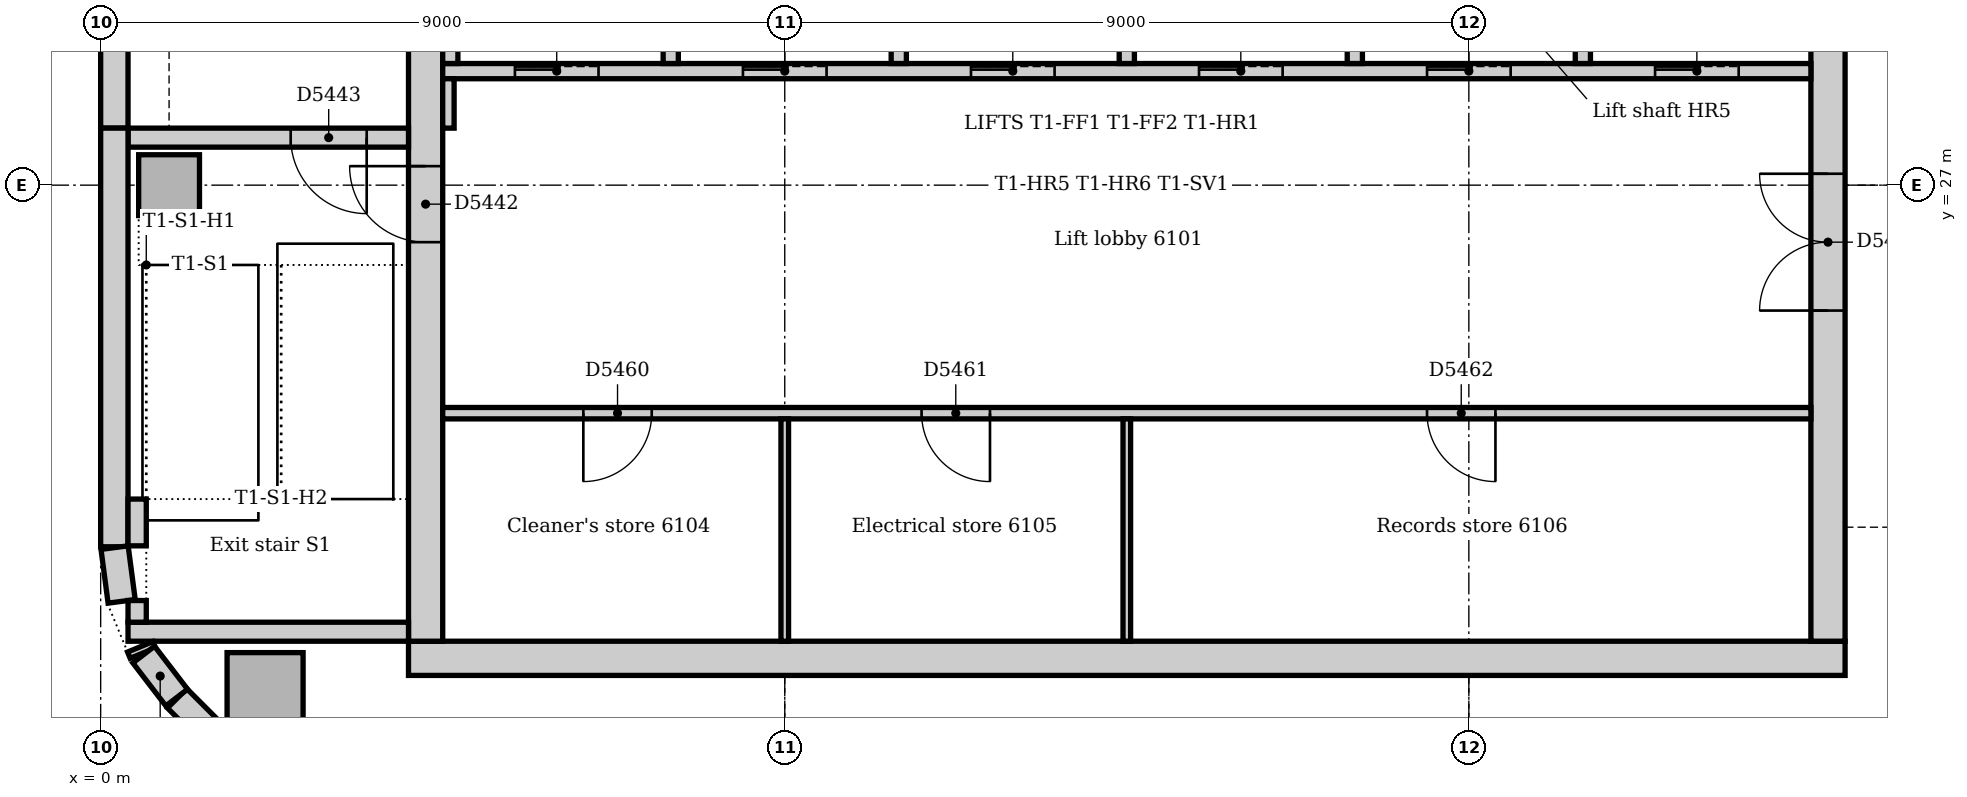
"""IFC4 building model, lengths in metres.
Left out: names, types, materials, properties, quantities, classifications, styles, units other than length and angle.
Written with IfcOpenShell. Run it as: python <this file> out.ifc"""

import sys

from ifc_helpers import new_model, si_unit, direction, frame, frame_2d, origin, origin_2d, place, context, subcontext, project, spatial, rectangle, extrude, element, fill, save


model = new_model("IFC4")
c1 = context("Model", 3, precision=1e-05, world=origin(), true_north=direction((0.0, 1.0)))
c2 = subcontext(c1, "Body", "Model", "MODEL_VIEW")
j1 = project(units=[si_unit("LENGTHUNIT", "METRE"), si_unit("PLANEANGLEUNIT", "RADIAN")], contexts=[c1])
p1 = place(None, origin())
s1 = spatial("IfcSite", under=j1, at=p1, CompositionType="ELEMENT")
p2 = place(p1, origin())
s2 = spatial("IfcBuilding", under=s1, at=p2, CompositionType="ELEMENT")
p3 = place(p2, frame((0.0, 0.0, 255.0)))
s3 = spatial("IfcBuildingStorey", under=s2, at=p3, CompositionType="ELEMENT", Elevation=255.0)
p4 = place(p3, frame((4.05, 20.775, 0.0), z_axis=(0.0, 0.0, 1.0), x_axis=(1.0, 0.0, 0.0)))
e1 = element("IfcWall", 1, at=p4, inside=s3, PredefinedType="SOLIDWALL", context=c2, shape_type="SweptSolid", body=[
    extrude(rectangle(XDim=18.9, YDim=0.45, at=frame_2d((9.45, 0.0))), origin(), (0.0, 0.0, 1.0), 4.0),
])
p5 = place(p3, frame((22.725, 21.0, 0.0), z_axis=(0.0, 0.0, 1.0), x_axis=(0.0, 1.0, 0.0)))
e2 = element("IfcWall", 2, at=p5, inside=s3, PredefinedType="SOLIDWALL", context=c2, shape_type="SweptSolid", body=[
    extrude(rectangle(XDim=10.5, YDim=0.45, at=frame_2d((5.25, 0.0))), origin(), (0.0, 0.0, 1.0), 4.0),
])
p6 = place(p5, frame((4.35, 0.0, 0.0)))
e3 = element("IfcOpeningElement", 3, at=p6, cuts=e2, PredefinedType="OPENING", context=c2, shape_type="SweptSolid", body=[
    extrude(rectangle(XDim=1.8, YDim=2.1, at=frame_2d((0.9, 1.05))), frame((0.0, 0.235, 0.0), z_axis=(0.0, -1.0, 0.0), x_axis=(1.0, 0.0, 0.0)), (0.0, 0.0, 1.0), 0.47),
])
p7 = place(p3, frame((4.275, 31.5, 0.0), z_axis=(0.0, 0.0, 1.0), x_axis=(0.0, -1.0, 0.0)))
e4 = element("IfcWall", 4, at=p7, inside=s3, PredefinedType="SOLIDWALL", context=c2, shape_type="SweptSolid", body=[
    extrude(rectangle(XDim=10.5, YDim=0.45, at=frame_2d((5.25, 0.0))), origin(), (0.0, 0.0, 1.0), 4.0),
])
p8 = place(p7, frame((4.25, 0.0, 0.0)))
e5 = element("IfcOpeningElement", 5, at=p8, cuts=e4, PredefinedType="OPENING", context=c2, shape_type="SweptSolid", body=[
    extrude(rectangle(XDim=1.0, YDim=2.1, at=frame_2d((0.5, 1.05))), frame((0.0, 0.235, 0.0), z_axis=(0.0, -1.0, 0.0), x_axis=(1.0, 0.0, 0.0)), (0.0, 0.0, 1.0), 0.47),
])
p9 = place(p3, frame((0.36, 21.125, 0.0), z_axis=(0.0, 0.0, 1.0), x_axis=(1.0, 0.0, 0.0)))
e6 = element("IfcWall", 6, at=p9, inside=s3, PredefinedType="SOLIDWALL", context=c2, shape_type="SweptSolid", body=[
    extrude(rectangle(XDim=3.69, YDim=0.25, at=frame_2d((1.845, 0.0))), origin(), (0.0, 0.0, 1.0), 4.0),
])
p10 = place(p3, frame((4.05, 27.625, 0.0), z_axis=(0.0, 0.0, 1.0), x_axis=(-1.0, 0.0, 0.0)))
e7 = element("IfcWall", 7, at=p10, inside=s3, PredefinedType="SOLIDWALL", context=c2, shape_type="SweptSolid", body=[
    extrude(rectangle(XDim=3.69, YDim=0.25, at=frame_2d((1.845, 0.0))), origin(), (0.0, 0.0, 1.0), 4.0),
])
p11 = place(p10, frame((0.55, 0.0, 0.0)))
e8 = element("IfcOpeningElement", 8, at=p11, cuts=e7, PredefinedType="OPENING", context=c2, shape_type="SweptSolid", body=[
    extrude(rectangle(XDim=1.0, YDim=2.1, at=frame_2d((0.5, 1.05))), frame((0.0, 0.135, 0.0), z_axis=(0.0, -1.0, 0.0), x_axis=(1.0, 0.0, 0.0)), (0.0, 0.0, 1.0), 0.27),
])
p12 = place(p3, frame((2.163, 20.35, 0.0), z_axis=(0.0, 0.0, 1.0), x_axis=(1.0, 0.0, 0.0)))
e9 = element("IfcColumn", 9, at=p12, inside=s3, PredefinedType="COLUMN", context=c2, shape_type="SweptSolid", body=[
    extrude(rectangle(XDim=1.0, YDim=1.0, at=origin_2d()), origin(), (0.0, 0.0, 1.0), 3.85),
])
p13 = place(p3, frame((0.9, 27.0, 0.0), z_axis=(0.0, 0.0, 1.0), x_axis=(1.0, 0.0, 0.0)))
e10 = element("IfcColumn", 10, at=p13, inside=s3, PredefinedType="COLUMN", context=c2, shape_type="SweptSolid", body=[
    extrude(rectangle(XDim=0.8, YDim=0.8, at=origin_2d()), origin(), (0.0, 0.0, 1.0), 4.0),
])
p14 = place(p3, frame((0.18, 35.25, 0.0), z_axis=(0.0, 0.0, 1.0), x_axis=(0.0, -1.0, 0.0)))
e11 = element("IfcWall", 11, at=p14, inside=s3, PredefinedType="STANDARD", context=c2, shape_type="SweptSolid", body=[
    extrude(rectangle(XDim=7.5, YDim=0.36, at=frame_2d((3.75, 0.0))), origin(), (0.0, 0.0, 1.0), 3.85),
])
p15 = place(p3, frame((0.18, 27.75, 0.0), z_axis=(0.0, 0.0, 1.0), x_axis=(0.0, -1.0, 0.0)))
e12 = element("IfcWall", 12, at=p15, inside=s3, PredefinedType="STANDARD", context=c2, shape_type="SweptSolid", body=[
    extrude(rectangle(XDim=5.507, YDim=0.36, at=frame_2d((2.754, 0.0))), origin(), (0.0, 0.0, 1.0), 3.85),
])
p16 = place(p3, frame((1.006, 20.249, 0.0), z_axis=(0.0, 0.0, 1.0), x_axis=(0.707106781187, -0.707106781187, 0.0)))
e13 = element("IfcWall", 13, at=p16, inside=s3, PredefinedType="STANDARD", context=c2, shape_type="SweptSolid", body=[
    extrude(rectangle(XDim=1.757, YDim=0.36, at=frame_2d((0.879, 0.0))), origin(), (0.0, 0.0, 1.0), 3.85),
])
p17 = place(p3, frame((0.183, 22.231, 0.0), z_axis=(0.0, 0.0, 1.0), x_axis=(0.13055608231, -0.99144092581, 0.0)))
e14 = element("IfcWall", 14, at=p17, inside=s3, PredefinedType="STANDARD", context=c2, shape_type="SweptSolid", body=[
    extrude(rectangle(XDim=0.713, YDim=0.36, at=frame_2d((0.356, 0.0))), origin(), (0.0, 0.0, 1.0), 3.85),
])
p18 = place(p3, frame((0.521, 20.927, 0.0), z_axis=(0.0, 0.0, 1.0), x_axis=(0.382549378284, -0.923935048136, 0.0)))
e15 = element("IfcWall", 15, at=p18, inside=s3, PredefinedType="STANDARD", context=c2, shape_type="SweptSolid", body=[
    extrude(rectangle(XDim=0.089, YDim=0.36, at=frame_2d((0.045, 0.0))), origin(), (0.0, 0.0, 1.0), 3.85),
])
p19 = place(p3, frame((0.566, 20.825, 0.0), z_axis=(0.0, 0.0, 1.0), x_axis=(0.608802368033, -0.793321924995, 0.0)))
e16 = element("IfcWall", 16, at=p19, inside=s3, PredefinedType="STANDARD", context=c2, shape_type="SweptSolid", body=[
    extrude(rectangle(XDim=0.713, YDim=0.36, at=frame_2d((0.357, 0.0))), origin(), (0.0, 0.0, 1.0), 3.85),
])
p20 = place(p3, frame((0.48, 21.25, 0.0), z_axis=(0.0, 0.0, 1.0), x_axis=(0.0, 1.0, 0.0)))
e17 = element("IfcWall", 17, at=p20, inside=s3, PredefinedType="STANDARD", context=c2, shape_type="SweptSolid", body=[
    extrude(rectangle(XDim=0.285, YDim=0.24, at=frame_2d((0.143, 0.0))), origin(), (0.0, 0.0, 1.0), 4.0),
])
p21 = place(p3, frame((0.48, 22.255, 0.0), z_axis=(0.0, 0.0, 1.0), x_axis=(0.0, 1.0, 0.0)))
e18 = element("IfcWall", 18, at=p21, inside=s3, PredefinedType="STANDARD", context=c2, shape_type="SweptSolid", body=[
    extrude(rectangle(XDim=0.615, YDim=0.24, at=frame_2d((0.307, 0.0))), origin(), (0.0, 0.0, 1.0), 4.0),
])
p22 = place(p3, frame((4.5, 28.5, 0.0), z_axis=(0.0, 0.0, 1.0), x_axis=(1.0, 0.0, 0.0)))
e19 = element("IfcWall", 19, at=p22, inside=s3, PredefinedType="PARTITIONING", context=c2, shape_type="SweptSolid", body=[
    extrude(rectangle(XDim=18.0, YDim=0.2, at=frame_2d((9.0, 0.0))), origin(), (0.0, 0.0, 1.0), 3.85),
])
p23 = place(p22, frame((0.95, 0.0, 0.0)))
e20 = element("IfcOpeningElement", 20, at=p23, cuts=e19, PredefinedType="OPENING", context=c2, shape_type="SweptSolid", body=[
    extrude(rectangle(XDim=1.1, YDim=2.1, at=frame_2d((0.55, 1.05))), frame((0.0, 0.11, 0.0), z_axis=(0.0, -1.0, 0.0), x_axis=(1.0, 0.0, 0.0)), (0.0, 0.0, 1.0), 0.22),
])
p24 = place(p22, frame((3.95, 0.0, 0.0)))
e21 = element("IfcOpeningElement", 21, at=p24, cuts=e19, PredefinedType="OPENING", context=c2, shape_type="SweptSolid", body=[
    extrude(rectangle(XDim=1.1, YDim=2.1, at=frame_2d((0.55, 1.05))), frame((0.0, 0.11, 0.0), z_axis=(0.0, -1.0, 0.0), x_axis=(1.0, 0.0, 0.0)), (0.0, 0.0, 1.0), 0.22),
])
p25 = place(p22, frame((6.95, 0.0, 0.0)))
e22 = element("IfcOpeningElement", 22, at=p25, cuts=e19, PredefinedType="OPENING", context=c2, shape_type="SweptSolid", body=[
    extrude(rectangle(XDim=1.1, YDim=2.1, at=frame_2d((0.55, 1.05))), frame((0.0, 0.11, 0.0), z_axis=(0.0, -1.0, 0.0), x_axis=(1.0, 0.0, 0.0)), (0.0, 0.0, 1.0), 0.22),
])
p26 = place(p22, frame((9.95, 0.0, 0.0)))
e23 = element("IfcOpeningElement", 23, at=p26, cuts=e19, PredefinedType="OPENING", context=c2, shape_type="SweptSolid", body=[
    extrude(rectangle(XDim=1.1, YDim=2.1, at=frame_2d((0.55, 1.05))), frame((0.0, 0.11, 0.0), z_axis=(0.0, -1.0, 0.0), x_axis=(1.0, 0.0, 0.0)), (0.0, 0.0, 1.0), 0.22),
])
p27 = place(p22, frame((12.95, 0.0, 0.0)))
e24 = element("IfcOpeningElement", 24, at=p27, cuts=e19, PredefinedType="OPENING", context=c2, shape_type="SweptSolid", body=[
    extrude(rectangle(XDim=1.1, YDim=2.1, at=frame_2d((0.55, 1.05))), frame((0.0, 0.11, 0.0), z_axis=(0.0, -1.0, 0.0), x_axis=(1.0, 0.0, 0.0)), (0.0, 0.0, 1.0), 0.22),
])
p28 = place(p22, frame((15.95, 0.0, 0.0)))
e25 = element("IfcOpeningElement", 25, at=p28, cuts=e19, PredefinedType="OPENING", context=c2, shape_type="SweptSolid", body=[
    extrude(rectangle(XDim=1.1, YDim=2.1, at=frame_2d((0.55, 1.05))), frame((0.0, 0.11, 0.0), z_axis=(0.0, -1.0, 0.0), x_axis=(1.0, 0.0, 0.0)), (0.0, 0.0, 1.0), 0.22),
])
for number, where, z_axis, x_axis in (
    (26, (10.5, 28.6, 0.0), (0.0, 0.0, 1.0), (0.0, 1.0, 0.0)),
    (27, (13.5, 28.6, 0.0), (0.0, 0.0, 1.0), (0.0, 1.0, 0.0)),
    (28, (16.5, 28.6, 0.0), (0.0, 0.0, 1.0), (0.0, 1.0, 0.0)),
    (29, (19.5, 28.6, 0.0), (0.0, 0.0, 1.0), (0.0, 1.0, 0.0)),
    (30, (4.6, 28.6, 0.0), (0.0, 0.0, 1.0), (0.0, 1.0, 0.0)),
    (31, (7.5, 28.6, 0.0), (0.0, 0.0, 1.0), (0.0, 1.0, 0.0)),
):
    element("IfcWall", number, at=place(p3, frame(where, z_axis=z_axis, x_axis=x_axis)), inside=s3, PredefinedType="PARTITIONING", context=c2, shape_type="SweptSolid", body=[
        extrude(rectangle(XDim=2.65, YDim=0.2, at=frame_2d((1.325, 0.0))), origin(), (0.0, 0.0, 1.0), 3.85),
    ])
p29 = place(p3, frame((4.5, 24.0, 0.0), z_axis=(0.0, 0.0, 1.0), x_axis=(1.0, 0.0, 0.0)))
e32 = element("IfcWall", 32, at=p29, inside=s3, PredefinedType="PARTITIONING", context=c2, shape_type="SweptSolid", body=[
    extrude(rectangle(XDim=18.0, YDim=0.15, at=frame_2d((9.0, 0.0))), origin(), (0.0, 0.0, 1.0), 3.85),
])
p30 = place(p29, frame((1.85, 0.0, 0.0)))
e33 = element("IfcOpeningElement", 33, at=p30, cuts=e32, PredefinedType="OPENING", context=c2, shape_type="SweptSolid", body=[
    extrude(rectangle(XDim=0.9, YDim=2.1, at=frame_2d((0.45, 1.05))), frame((0.0, 0.085, 0.0), z_axis=(0.0, -1.0, 0.0), x_axis=(1.0, 0.0, 0.0)), (0.0, 0.0, 1.0), 0.17),
])
p31 = place(p29, frame((6.3, 0.0, 0.0)))
e34 = element("IfcOpeningElement", 34, at=p31, cuts=e32, PredefinedType="OPENING", context=c2, shape_type="SweptSolid", body=[
    extrude(rectangle(XDim=0.9, YDim=2.1, at=frame_2d((0.45, 1.05))), frame((0.0, 0.085, 0.0), z_axis=(0.0, -1.0, 0.0), x_axis=(1.0, 0.0, 0.0)), (0.0, 0.0, 1.0), 0.17),
])
p32 = place(p29, frame((12.95, 0.0, 0.0)))
e35 = element("IfcOpeningElement", 35, at=p32, cuts=e32, PredefinedType="OPENING", context=c2, shape_type="SweptSolid", body=[
    extrude(rectangle(XDim=0.9, YDim=2.1, at=frame_2d((0.45, 1.05))), frame((0.0, 0.085, 0.0), z_axis=(0.0, -1.0, 0.0), x_axis=(1.0, 0.0, 0.0)), (0.0, 0.0, 1.0), 0.17),
])
p33 = place(p3, frame((4.575, 27.75, 0.0), z_axis=(0.0, 0.0, 1.0), x_axis=(0.0, 1.0, 0.0)))
e36 = element("IfcWall", 36, at=p33, inside=s3, PredefinedType="PARTITIONING", context=c2, shape_type="SweptSolid", body=[
    extrude(rectangle(XDim=0.65, YDim=0.15, at=frame_2d((0.325, 0.0))), origin(), (0.0, 0.0, 1.0), 3.85),
])
for number, where, z_axis, x_axis in (
    (37, (9.0, 21.0, 0.0), (0.0, 0.0, 1.0), (0.0, 1.0, 0.0)),
    (38, (13.5, 21.0, 0.0), (0.0, 0.0, 1.0), (0.0, 1.0, 0.0)),
):
    element("IfcWall", number, at=place(p3, frame(where, z_axis=z_axis, x_axis=x_axis)), inside=s3, PredefinedType="PARTITIONING", context=c2, shape_type="SweptSolid", body=[
        extrude(rectangle(XDim=2.925, YDim=0.1, at=frame_2d((1.462, 0.0))), origin(), (0.0, 0.0, 1.0), 3.85),
    ])
p34 = place(p8, frame((1.0, 0.0, 0.0), z_axis=(0.0, 0.0, 1.0), x_axis=(-1.0, 0.0, 0.0)))
e39 = element("IfcDoor", 39, at=p34, inside=s3, OperationType="SINGLE_SWING_RIGHT", PredefinedType="DOOR", context=c2, shape_type="SweptSolid", body=[
    extrude(rectangle(XDim=1.0, YDim=2.1, at=frame_2d((0.5, 1.05))), frame((0.0, 0.025, 0.0), z_axis=(0.0, -1.0, 0.0), x_axis=(1.0, 0.0, 0.0)), (0.0, 0.0, 1.0), 0.05),
])
fill(e5, e39)
p35 = place(p11, origin())
e40 = element("IfcDoor", 40, at=p35, inside=s3, OperationType="SINGLE_SWING_LEFT", PredefinedType="DOOR", context=c2, shape_type="SweptSolid", body=[
    extrude(rectangle(XDim=1.0, YDim=2.1, at=frame_2d((0.5, 1.05))), frame((0.0, 0.025, 0.0), z_axis=(0.0, -1.0, 0.0), x_axis=(1.0, 0.0, 0.0)), (0.0, 0.0, 1.0), 0.05),
])
fill(e8, e40)
p36 = place(p23, origin())
e41 = element("IfcDoor", 41, at=p36, inside=s3, OperationType="SLIDING_TO_LEFT", PredefinedType="DOOR", context=c2, shape_type="SweptSolid", body=[
    extrude(rectangle(XDim=1.1, YDim=2.1, at=frame_2d((0.55, 1.05))), frame((0.0, 0.025, 0.0), z_axis=(0.0, -1.0, 0.0), x_axis=(1.0, 0.0, 0.0)), (0.0, 0.0, 1.0), 0.05),
])
fill(e20, e41)
p37 = place(p24, origin())
e42 = element("IfcDoor", 42, at=p37, inside=s3, OperationType="SLIDING_TO_LEFT", PredefinedType="DOOR", context=c2, shape_type="SweptSolid", body=[
    extrude(rectangle(XDim=1.1, YDim=2.1, at=frame_2d((0.55, 1.05))), frame((0.0, 0.025, 0.0), z_axis=(0.0, -1.0, 0.0), x_axis=(1.0, 0.0, 0.0)), (0.0, 0.0, 1.0), 0.05),
])
fill(e21, e42)
p38 = place(p25, origin())
e43 = element("IfcDoor", 43, at=p38, inside=s3, OperationType="SLIDING_TO_LEFT", PredefinedType="DOOR", context=c2, shape_type="SweptSolid", body=[
    extrude(rectangle(XDim=1.1, YDim=2.1, at=frame_2d((0.55, 1.05))), frame((0.0, 0.025, 0.0), z_axis=(0.0, -1.0, 0.0), x_axis=(1.0, 0.0, 0.0)), (0.0, 0.0, 1.0), 0.05),
])
fill(e22, e43)
p39 = place(p26, origin())
e44 = element("IfcDoor", 44, at=p39, inside=s3, OperationType="SLIDING_TO_LEFT", PredefinedType="DOOR", context=c2, shape_type="SweptSolid", body=[
    extrude(rectangle(XDim=1.1, YDim=2.1, at=frame_2d((0.55, 1.05))), frame((0.0, 0.025, 0.0), z_axis=(0.0, -1.0, 0.0), x_axis=(1.0, 0.0, 0.0)), (0.0, 0.0, 1.0), 0.05),
])
fill(e23, e44)
p40 = place(p27, origin())
e45 = element("IfcDoor", 45, at=p40, inside=s3, OperationType="SLIDING_TO_LEFT", PredefinedType="DOOR", context=c2, shape_type="SweptSolid", body=[
    extrude(rectangle(XDim=1.1, YDim=2.1, at=frame_2d((0.55, 1.05))), frame((0.0, 0.025, 0.0), z_axis=(0.0, -1.0, 0.0), x_axis=(1.0, 0.0, 0.0)), (0.0, 0.0, 1.0), 0.05),
])
fill(e24, e45)
p41 = place(p28, origin())
e46 = element("IfcDoor", 46, at=p41, inside=s3, OperationType="SLIDING_TO_LEFT", PredefinedType="DOOR", context=c2, shape_type="SweptSolid", body=[
    extrude(rectangle(XDim=1.1, YDim=2.1, at=frame_2d((0.55, 1.05))), frame((0.0, 0.025, 0.0), z_axis=(0.0, -1.0, 0.0), x_axis=(1.0, 0.0, 0.0)), (0.0, 0.0, 1.0), 0.05),
])
fill(e25, e46)
p42 = place(p6, origin())
e47 = element("IfcDoor", 47, at=p42, inside=s3, OperationType="DOUBLE_DOOR_DOUBLE_SWING", PredefinedType="DOOR", context=c2, shape_type="SweptSolid", body=[
    extrude(rectangle(XDim=1.8, YDim=2.1, at=frame_2d((0.9, 1.05))), frame((0.0, 0.025, 0.0), z_axis=(0.0, -1.0, 0.0), x_axis=(1.0, 0.0, 0.0)), (0.0, 0.0, 1.0), 0.05),
])
fill(e3, e47)
p43 = place(p30, frame((0.9, 0.0, 0.0), z_axis=(0.0, 0.0, 1.0), x_axis=(-1.0, 0.0, 0.0)))
e48 = element("IfcDoor", 48, at=p43, inside=s3, OperationType="SINGLE_SWING_RIGHT", PredefinedType="DOOR", context=c2, shape_type="SweptSolid", body=[
    extrude(rectangle(XDim=0.9, YDim=2.1, at=frame_2d((0.45, 1.05))), frame((0.0, 0.025, 0.0), z_axis=(0.0, -1.0, 0.0), x_axis=(1.0, 0.0, 0.0)), (0.0, 0.0, 1.0), 0.05),
])
fill(e33, e48)
p44 = place(p31, frame((0.9, 0.0, 0.0), z_axis=(0.0, 0.0, 1.0), x_axis=(-1.0, 0.0, 0.0)))
e49 = element("IfcDoor", 49, at=p44, inside=s3, OperationType="SINGLE_SWING_LEFT", PredefinedType="DOOR", context=c2, shape_type="SweptSolid", body=[
    extrude(rectangle(XDim=0.9, YDim=2.1, at=frame_2d((0.45, 1.05))), frame((0.0, 0.025, 0.0), z_axis=(0.0, -1.0, 0.0), x_axis=(1.0, 0.0, 0.0)), (0.0, 0.0, 1.0), 0.05),
])
fill(e34, e49)
p45 = place(p32, frame((0.9, 0.0, 0.0), z_axis=(0.0, 0.0, 1.0), x_axis=(-1.0, 0.0, 0.0)))
e50 = element("IfcDoor", 50, at=p45, inside=s3, OperationType="SINGLE_SWING_LEFT", PredefinedType="DOOR", context=c2, shape_type="SweptSolid", body=[
    extrude(rectangle(XDim=0.9, YDim=2.1, at=frame_2d((0.45, 1.05))), frame((0.0, 0.025, 0.0), z_axis=(0.0, -1.0, 0.0), x_axis=(1.0, 0.0, 0.0)), (0.0, 0.0, 1.0), 0.05),
])
fill(e35, e50)
save(model, sys.argv[1])
